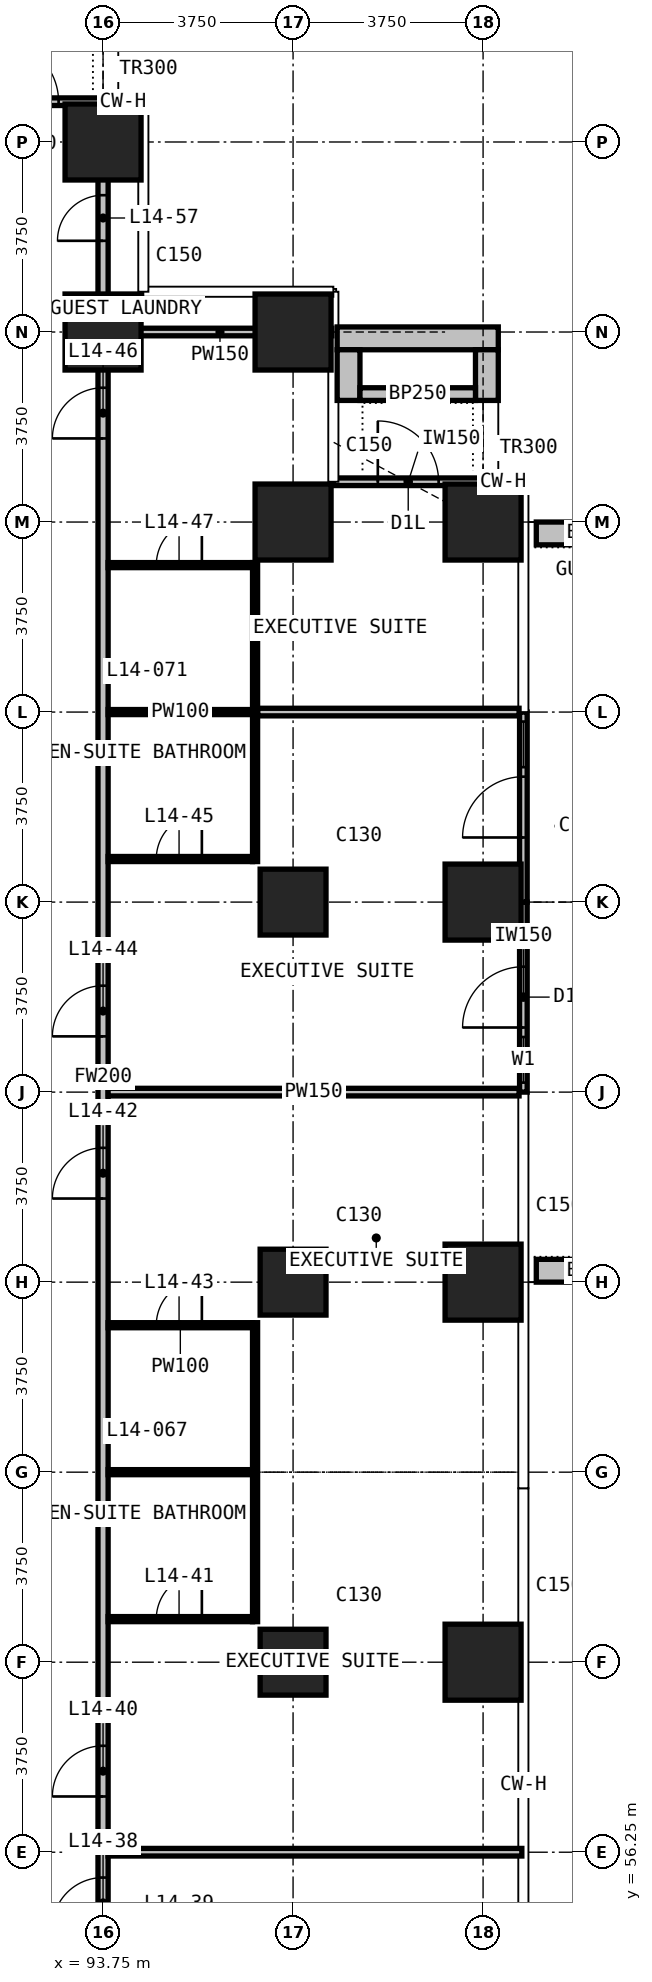
"""IFC4 building model, lengths in metres.
Left out: names, types, materials, properties, quantities, classifications, styles, units other than length and angle.
Written with IfcOpenShell. Run it as: python <this file> out.ifc"""

import sys

from ifc_helpers import new_model, si_unit, direction, frame, frame_2d, origin, origin_2d, place, context, subcontext, project, spatial, rectangle, extrude, element, fill, save


model = new_model("IFC4")
c1 = context("Model", 3, precision=1e-05, world=origin(), true_north=direction((0.0, 1.0)))
c2 = subcontext(c1, "Body", "Model", "MODEL_VIEW")
j1 = project(units=[si_unit("LENGTHUNIT", "METRE"), si_unit("PLANEANGLEUNIT", "RADIAN")], contexts=[c1])
p1 = place(None, origin())
s1 = spatial("IfcSite", under=j1, at=p1, CompositionType="ELEMENT")
p2 = place(p1, origin())
s2 = spatial("IfcBuilding", under=s1, at=p2, CompositionType="ELEMENT")
p3 = place(p2, frame((0.0, 0.0, 65.9)))
s3 = spatial("IfcBuildingStorey", under=s2, at=p3, CompositionType="ELEMENT", Elevation=65.9)
for number, where, z_axis, x_axis in (
    (1, (93.75, 86.25, 0.0), (0.0, 0.0, 1.0), (1.0, 0.0, 0.0)),
    (2, (93.75, 90.0, 0.0), (0.0, 0.0, 1.0), (1.0, 0.0, 0.0)),
):
    element("IfcColumn", number, at=place(p3, frame(where, z_axis=z_axis, x_axis=x_axis)), inside=s3, PredefinedType="COLUMN", context=c2, shape_type="SweptSolid", body=[
        extrude(rectangle(XDim=1.5, YDim=1.5, at=origin_2d()), origin(), (0.0, 0.0, 1.0), 3.3),
    ])
for number, where, z_axis, x_axis in (
    (3, (97.5, 60.0, 0.0), (0.0, 0.0, 1.0), (1.0, 0.0, 0.0)),
    (4, (97.5, 67.5, 0.0), (0.0, 0.0, 1.0), (1.0, 0.0, 0.0)),
    (5, (97.5, 75.0, 0.0), (0.0, 0.0, 1.0), (1.0, 0.0, 0.0)),
):
    element("IfcColumn", number, at=place(p3, frame(where, z_axis=z_axis, x_axis=x_axis)), inside=s3, PredefinedType="COLUMN", context=c2, shape_type="SweptSolid", body=[
        extrude(rectangle(XDim=1.3, YDim=1.3, at=origin_2d()), origin(), (0.0, 0.0, 1.0), 3.3),
    ])
for number, where, z_axis, x_axis in (
    (6, (97.5, 82.5, 0.0), (0.0, 0.0, 1.0), (1.0, 0.0, 0.0)),
    (7, (97.5, 86.25, 0.0), (0.0, 0.0, 1.0), (1.0, 0.0, 0.0)),
    (8, (101.25, 60.0, 0.0), (0.0, 0.0, 1.0), (1.0, 0.0, 0.0)),
    (9, (101.25, 67.5, 0.0), (0.0, 0.0, 1.0), (1.0, 0.0, 0.0)),
    (10, (101.25, 75.0, 0.0), (0.0, 0.0, 1.0), (1.0, 0.0, 0.0)),
    (11, (101.25, 82.5, 0.0), (0.0, 0.0, 1.0), (1.0, 0.0, 0.0)),
):
    element("IfcColumn", number, at=place(p3, frame(where, z_axis=z_axis, x_axis=x_axis)), inside=s3, PredefinedType="COLUMN", context=c2, shape_type="SweptSolid", body=[
        extrude(rectangle(XDim=1.5, YDim=1.5, at=origin_2d()), origin(), (0.0, 0.0, 1.0), 3.3),
    ])
p4 = place(p3, frame((102.045, 71.25, 0.0), z_axis=(0.0, 0.0, 1.0), x_axis=(0.0, 1.0, 0.0)))
e12 = element("IfcWall", 12, at=p4, inside=s3, PredefinedType="SOLIDWALL", context=c2, shape_type="SweptSolid", body=[
    extrude(rectangle(XDim=3.75, YDim=0.15, at=frame_2d((1.875, 0.0))), origin(), (0.0, 0.0, 1.0), 3.0),
])
p5 = place(p4, frame((0.188, 0.0, 0.1)))
e13 = element("IfcOpeningElement", 13, at=p5, cuts=e12, PredefinedType="OPENING", context=c2, shape_type="SweptSolid", body=[
    extrude(rectangle(XDim=0.9, YDim=2.4, at=frame_2d((0.45, 1.2))), frame((0.0, 0.085, 0.0), z_axis=(0.0, -1.0, 0.0), x_axis=(1.0, 0.0, 0.0)), (0.0, 0.0, 1.0), 0.17),
])
p6 = place(p4, frame((1.275, 0.0, 0.0)))
e14 = element("IfcOpeningElement", 14, at=p6, cuts=e12, PredefinedType="OPENING", context=c2, shape_type="SweptSolid", body=[
    extrude(rectangle(XDim=1.2, YDim=2.4, at=frame_2d((0.6, 1.2))), frame((0.0, 0.085, 0.0), z_axis=(0.0, -1.0, 0.0), x_axis=(1.0, 0.0, 0.0)), (0.0, 0.0, 1.0), 0.17),
])
p7 = place(p3, frame((102.045, 75.0, 0.0), z_axis=(0.0, 0.0, 1.0), x_axis=(0.0, 1.0, 0.0)))
e15 = element("IfcWall", 15, at=p7, inside=s3, PredefinedType="SOLIDWALL", context=c2, shape_type="SweptSolid", body=[
    extrude(rectangle(XDim=3.75, YDim=0.15, at=frame_2d((1.875, 0.0))), origin(), (0.0, 0.0, 1.0), 3.0),
])
p8 = place(p7, frame((1.275, 0.0, 0.0)))
e16 = element("IfcOpeningElement", 16, at=p8, cuts=e15, PredefinedType="OPENING", context=c2, shape_type="SweptSolid", body=[
    extrude(rectangle(XDim=1.2, YDim=2.4, at=frame_2d((0.6, 1.2))), frame((0.0, 0.085, 0.0), z_axis=(0.0, -1.0, 0.0), x_axis=(1.0, 0.0, 0.0)), (0.0, 0.0, 1.0), 0.17),
])
p9 = place(p7, frame((2.663, 0.0, 0.1)))
e17 = element("IfcOpeningElement", 17, at=p9, cuts=e15, PredefinedType="OPENING", context=c2, shape_type="SweptSolid", body=[
    extrude(rectangle(XDim=0.9, YDim=2.4, at=frame_2d((0.45, 1.2))), frame((0.0, 0.085, 0.0), z_axis=(0.0, -1.0, 0.0), x_axis=(1.0, 0.0, 0.0)), (0.0, 0.0, 1.0), 0.17),
])
p10 = place(p3, frame((98.295, 83.295, 0.0), z_axis=(0.0, 0.0, 1.0), x_axis=(1.0, 0.0, 0.0)))
e18 = element("IfcWall", 18, at=p10, inside=s3, PredefinedType="SOLIDWALL", context=c2, shape_type="SweptSolid", body=[
    extrude(rectangle(XDim=2.955, YDim=0.15, at=frame_2d((1.478, 0.0))), origin(), (0.0, 0.0, 1.0), 3.0),
])
p11 = place(p10, frame((0.877, 0.0, 0.0)))
e19 = element("IfcOpeningElement", 19, at=p11, cuts=e18, PredefinedType="OPENING", context=c2, shape_type="SweptSolid", body=[
    extrude(rectangle(XDim=1.2, YDim=2.0, at=frame_2d((0.6, 1.0))), frame((0.0, 0.085, 0.0), z_axis=(0.0, -1.0, 0.0), x_axis=(1.0, 0.0, 0.0)), (0.0, 0.0, 1.0), 0.17),
])
p12 = place(p3, frame((90.795, 90.795, 0.0), z_axis=(0.0, 0.0, 1.0), x_axis=(1.0, 0.0, 0.0)))
e20 = element("IfcWall", 20, at=p12, inside=s3, PredefinedType="SOLIDWALL", context=c2, shape_type="SweptSolid", body=[
    extrude(rectangle(XDim=2.955, YDim=0.15, at=frame_2d((1.478, 0.0))), origin(), (0.0, 0.0, 1.0), 3.0),
])
p13 = place(p12, frame((0.877, 0.0, 0.0)))
e21 = element("IfcOpeningElement", 21, at=p13, cuts=e20, PredefinedType="OPENING", context=c2, shape_type="SweptSolid", body=[
    extrude(rectangle(XDim=1.2, YDim=2.4, at=frame_2d((0.6, 1.2))), frame((0.0, 0.085, 0.0), z_axis=(0.0, -1.0, 0.0), x_axis=(1.0, 0.0, 0.0)), (0.0, 0.0, 1.0), 0.17),
])
for number, where, z_axis, x_axis in (
    (22, (102.3, 67.725, 0.0), (0.0, 0.0, 1.0), (1.0, 0.0, 0.0)),
    (23, (102.3, 82.275, 0.0), (0.0, 0.0, 1.0), (1.0, 0.0, 0.0)),
):
    element("IfcWall", number, at=place(p3, frame(where, z_axis=z_axis, x_axis=x_axis)), inside=s3, PredefinedType="USERDEFINED", context=c2, shape_type="SweptSolid", body=[
        extrude(rectangle(XDim=2.35, YDim=0.45, at=frame_2d((1.175, 0.0))), origin(), (0.0, 0.0, 1.0), 1.1),
    ])
p14 = place(p3, frame((98.37, 86.125, 0.0), z_axis=(0.0, 0.0, 1.0), x_axis=(1.0, 0.0, 0.0)))
e24 = element("IfcWall", 24, at=p14, inside=s3, PredefinedType="USERDEFINED", context=c2, shape_type="SweptSolid", body=[
    extrude(rectangle(XDim=3.18, YDim=0.45, at=frame_2d((1.59, 0.0))), origin(), (0.0, 0.0, 1.0), 1.1),
])
for number, where, z_axis, x_axis in (
    (25, (98.595, 84.9, 0.0), (0.0, 0.0, 1.0), (0.0, 1.0, 0.0)),
    (26, (101.325, 84.9, 0.0), (0.0, 0.0, 1.0), (0.0, 1.0, 0.0)),
):
    element("IfcWall", number, at=place(p3, frame(where, z_axis=z_axis, x_axis=x_axis)), inside=s3, PredefinedType="USERDEFINED", context=c2, shape_type="SweptSolid", body=[
        extrude(rectangle(XDim=1.0, YDim=0.45, at=frame_2d((0.5, 0.0))), origin(), (0.0, 0.0, 1.0), 1.1),
    ])
p15 = place(p3, frame((98.82, 85.025, 0.0), z_axis=(0.0, 0.0, 1.0), x_axis=(1.0, 0.0, 0.0)))
e27 = element("IfcWall", 27, at=p15, inside=s3, PredefinedType="USERDEFINED", context=c2, shape_type="SweptSolid", body=[
    extrude(rectangle(XDim=2.28, YDim=0.25, at=frame_2d((1.14, 0.0))), origin(), (0.0, 0.0, 1.0), 1.0),
])
p16 = place(p3, frame((93.75, 52.4, 0.0), z_axis=(0.0, 0.0, 1.0), x_axis=(0.0, 1.0, 0.0)))
e28 = element("IfcWall", 28, at=p16, inside=s3, PredefinedType="PARTITIONING", context=c2, shape_type="SweptSolid", body=[
    extrude(rectangle(XDim=38.31, YDim=0.2, at=frame_2d((19.155, 0.0))), origin(), (0.0, 0.0, 1.0), 3.0),
])
p17 = place(p16, frame((2.35, 0.0, 0.0)))
e29 = element("IfcOpeningElement", 29, at=p17, cuts=e28, PredefinedType="OPENING", context=c2, shape_type="SweptSolid", body=[
    extrude(rectangle(XDim=1.0, YDim=2.2, at=frame_2d((0.5, 1.1))), frame((0.0, 0.11, 0.0), z_axis=(0.0, -1.0, 0.0), x_axis=(1.0, 0.0, 0.0)), (0.0, 0.0, 1.0), 0.22),
])
p18 = place(p16, frame((4.95, 0.0, 0.0)))
e30 = element("IfcOpeningElement", 30, at=p18, cuts=e28, PredefinedType="OPENING", context=c2, shape_type="SweptSolid", body=[
    extrude(rectangle(XDim=1.0, YDim=2.2, at=frame_2d((0.5, 1.1))), frame((0.0, 0.11, 0.0), z_axis=(0.0, -1.0, 0.0), x_axis=(1.0, 0.0, 0.0)), (0.0, 0.0, 1.0), 0.22),
])
p19 = place(p16, frame((16.75, 0.0, 0.0)))
e31 = element("IfcOpeningElement", 31, at=p19, cuts=e28, PredefinedType="OPENING", context=c2, shape_type="SweptSolid", body=[
    extrude(rectangle(XDim=1.0, YDim=2.2, at=frame_2d((0.5, 1.1))), frame((0.0, 0.11, 0.0), z_axis=(0.0, -1.0, 0.0), x_axis=(1.0, 0.0, 0.0)), (0.0, 0.0, 1.0), 0.22),
])
p20 = place(p16, frame((19.95, 0.0, 0.0)))
e32 = element("IfcOpeningElement", 32, at=p20, cuts=e28, PredefinedType="OPENING", context=c2, shape_type="SweptSolid", body=[
    extrude(rectangle(XDim=1.0, YDim=2.2, at=frame_2d((0.5, 1.1))), frame((0.0, 0.11, 0.0), z_axis=(0.0, -1.0, 0.0), x_axis=(1.0, 0.0, 0.0)), (0.0, 0.0, 1.0), 0.22),
])
p21 = place(p16, frame((31.75, 0.0, 0.0)))
e33 = element("IfcOpeningElement", 33, at=p21, cuts=e28, PredefinedType="OPENING", context=c2, shape_type="SweptSolid", body=[
    extrude(rectangle(XDim=1.0, YDim=2.2, at=frame_2d((0.5, 1.1))), frame((0.0, 0.11, 0.0), z_axis=(0.0, -1.0, 0.0), x_axis=(1.0, 0.0, 0.0)), (0.0, 0.0, 1.0), 0.22),
])
p22 = place(p16, frame((35.65, 0.0, 0.0)))
e34 = element("IfcOpeningElement", 34, at=p22, cuts=e28, PredefinedType="OPENING", context=c2, shape_type="SweptSolid", body=[
    extrude(rectangle(XDim=0.9, YDim=2.2, at=frame_2d((0.45, 1.1))), frame((0.0, 0.11, 0.0), z_axis=(0.0, -1.0, 0.0), x_axis=(1.0, 0.0, 0.0)), (0.0, 0.0, 1.0), 0.22),
])
p23 = place(p3, frame((93.85, 56.25, 0.0), z_axis=(0.0, 0.0, 1.0), x_axis=(1.0, 0.0, 0.0)))
e35 = element("IfcWall", 35, at=p23, inside=s3, PredefinedType="PARTITIONING", context=c2, shape_type="SweptSolid", body=[
    extrude(rectangle(XDim=8.165, YDim=0.15, at=frame_2d((4.083, 0.0))), origin(), (0.0, 0.0, 1.0), 3.0),
])
p24 = place(p3, frame((93.85, 71.25, 0.0), z_axis=(0.0, 0.0, 1.0), x_axis=(1.0, 0.0, 0.0)))
e36 = element("IfcWall", 36, at=p24, inside=s3, PredefinedType="PARTITIONING", context=c2, shape_type="SweptSolid", body=[
    extrude(rectangle(XDim=8.11, YDim=0.15, at=frame_2d((4.055, 0.0))), origin(), (0.0, 0.0, 1.0), 3.0),
])
p25 = place(p3, frame((96.8, 78.75, 0.0), z_axis=(0.0, 0.0, 1.0), x_axis=(1.0, 0.0, 0.0)))
e37 = element("IfcWall", 37, at=p25, inside=s3, PredefinedType="PARTITIONING", context=c2, shape_type="SweptSolid", body=[
    extrude(rectangle(XDim=5.16, YDim=0.15, at=frame_2d((2.58, 0.0))), origin(), (0.0, 0.0, 1.0), 3.0),
])
p26 = place(p3, frame((93.85, 86.25, 0.0), z_axis=(0.0, 0.0, 1.0), x_axis=(1.0, 0.0, 0.0)))
e38 = element("IfcWall", 38, at=p26, inside=s3, PredefinedType="PARTITIONING", context=c2, shape_type="SweptSolid", body=[
    extrude(rectangle(XDim=4.415, YDim=0.15, at=frame_2d((2.208, 0.0))), origin(), (0.0, 0.0, 1.0), 3.0),
])
p27 = place(p3, frame((93.85, 60.85, 0.0), z_axis=(0.0, 0.0, 1.0), x_axis=(1.0, 0.0, 0.0)))
e39 = element("IfcWall", 39, at=p27, inside=s3, PredefinedType="PARTITIONING", context=c2, shape_type="SweptSolid", body=[
    extrude(rectangle(XDim=2.85, YDim=0.1, at=frame_2d((1.425, 0.0))), origin(), (0.0, 0.0, 1.0), 3.0),
])
p28 = place(p27, frame((0.95, 0.0, 0.0)))
e40 = element("IfcOpeningElement", 40, at=p28, cuts=e39, PredefinedType="OPENING", context=c2, shape_type="SweptSolid", body=[
    extrude(rectangle(XDim=0.9, YDim=2.2, at=frame_2d((0.45, 1.1))), frame((0.0, 0.06, 0.0), z_axis=(0.0, -1.0, 0.0), x_axis=(1.0, 0.0, 0.0)), (0.0, 0.0, 1.0), 0.12),
])
p29 = place(p3, frame((93.85, 63.75, 0.0), z_axis=(0.0, 0.0, 1.0), x_axis=(1.0, 0.0, 0.0)))
e41 = element("IfcWall", 41, at=p29, inside=s3, PredefinedType="PARTITIONING", context=c2, shape_type="SweptSolid", body=[
    extrude(rectangle(XDim=2.85, YDim=0.1, at=frame_2d((1.425, 0.0))), origin(), (0.0, 0.0, 1.0), 3.0),
])
p30 = place(p3, frame((93.85, 66.65, 0.0), z_axis=(0.0, 0.0, 1.0), x_axis=(1.0, 0.0, 0.0)))
e42 = element("IfcWall", 42, at=p30, inside=s3, PredefinedType="PARTITIONING", context=c2, shape_type="SweptSolid", body=[
    extrude(rectangle(XDim=2.85, YDim=0.1, at=frame_2d((1.425, 0.0))), origin(), (0.0, 0.0, 1.0), 3.0),
])
p31 = place(p30, frame((0.95, 0.0, 0.0)))
e43 = element("IfcOpeningElement", 43, at=p31, cuts=e42, PredefinedType="OPENING", context=c2, shape_type="SweptSolid", body=[
    extrude(rectangle(XDim=0.9, YDim=2.2, at=frame_2d((0.45, 1.1))), frame((0.0, 0.06, 0.0), z_axis=(0.0, -1.0, 0.0), x_axis=(1.0, 0.0, 0.0)), (0.0, 0.0, 1.0), 0.12),
])
p32 = place(p3, frame((93.85, 75.85, 0.0), z_axis=(0.0, 0.0, 1.0), x_axis=(1.0, 0.0, 0.0)))
e44 = element("IfcWall", 44, at=p32, inside=s3, PredefinedType="PARTITIONING", context=c2, shape_type="SweptSolid", body=[
    extrude(rectangle(XDim=2.85, YDim=0.1, at=frame_2d((1.425, 0.0))), origin(), (0.0, 0.0, 1.0), 3.0),
])
p33 = place(p32, frame((0.95, 0.0, 0.0)))
e45 = element("IfcOpeningElement", 45, at=p33, cuts=e44, PredefinedType="OPENING", context=c2, shape_type="SweptSolid", body=[
    extrude(rectangle(XDim=0.9, YDim=2.2, at=frame_2d((0.45, 1.1))), frame((0.0, 0.06, 0.0), z_axis=(0.0, -1.0, 0.0), x_axis=(1.0, 0.0, 0.0)), (0.0, 0.0, 1.0), 0.12),
])
p34 = place(p3, frame((93.85, 78.75, 0.0), z_axis=(0.0, 0.0, 1.0), x_axis=(1.0, 0.0, 0.0)))
e46 = element("IfcWall", 46, at=p34, inside=s3, PredefinedType="PARTITIONING", context=c2, shape_type="SweptSolid", body=[
    extrude(rectangle(XDim=2.85, YDim=0.1, at=frame_2d((1.425, 0.0))), origin(), (0.0, 0.0, 1.0), 3.0),
])
p35 = place(p3, frame((93.85, 81.65, 0.0), z_axis=(0.0, 0.0, 1.0), x_axis=(1.0, 0.0, 0.0)))
e47 = element("IfcWall", 47, at=p35, inside=s3, PredefinedType="PARTITIONING", context=c2, shape_type="SweptSolid", body=[
    extrude(rectangle(XDim=2.85, YDim=0.1, at=frame_2d((1.425, 0.0))), origin(), (0.0, 0.0, 1.0), 3.0),
])
p36 = place(p35, frame((0.95, 0.0, 0.0)))
e48 = element("IfcOpeningElement", 48, at=p36, cuts=e47, PredefinedType="OPENING", context=c2, shape_type="SweptSolid", body=[
    extrude(rectangle(XDim=0.9, YDim=2.2, at=frame_2d((0.45, 1.1))), frame((0.0, 0.06, 0.0), z_axis=(0.0, -1.0, 0.0), x_axis=(1.0, 0.0, 0.0)), (0.0, 0.0, 1.0), 0.12),
])
for number, where, z_axis, x_axis in (
    (49, (96.75, 60.8, 0.0), (0.0, 0.0, 1.0), (0.0, 1.0, 0.0)),
    (50, (96.75, 75.8, 0.0), (0.0, 0.0, 1.0), (0.0, 1.0, 0.0)),
):
    element("IfcWall", number, at=place(p3, frame(where, z_axis=z_axis, x_axis=x_axis)), inside=s3, PredefinedType="PARTITIONING", context=c2, shape_type="SweptSolid", body=[
        extrude(rectangle(XDim=5.9, YDim=0.1, at=frame_2d((2.95, 0.0))), origin(), (0.0, 0.0, 1.0), 3.0),
    ])
p37 = place(p5, origin())
e51 = element("IfcWindow", 51, at=p37, inside=s3, PartitioningType="SINGLE_PANEL", PredefinedType="WINDOW", context=c2, shape_type="SweptSolid", body=[
    extrude(rectangle(XDim=0.9, YDim=2.4, at=frame_2d((0.45, 1.2))), frame((0.0, 0.03, 0.0), z_axis=(0.0, -1.0, 0.0), x_axis=(1.0, 0.0, 0.0)), (0.0, 0.0, 1.0), 0.06),
])
fill(e13, e51)
p38 = place(p6, origin())
e52 = element("IfcDoor", 52, at=p38, inside=s3, OperationType="SINGLE_SWING_LEFT", PredefinedType="DOOR", context=c2, shape_type="SweptSolid", body=[
    extrude(rectangle(XDim=1.2, YDim=2.4, at=frame_2d((0.6, 1.2))), frame((0.0, 0.025, 0.0), z_axis=(0.0, -1.0, 0.0), x_axis=(1.0, 0.0, 0.0)), (0.0, 0.0, 1.0), 0.05),
])
fill(e14, e52)
p39 = place(p8, origin())
e53 = element("IfcDoor", 53, at=p39, inside=s3, OperationType="SINGLE_SWING_LEFT", PredefinedType="DOOR", context=c2, shape_type="SweptSolid", body=[
    extrude(rectangle(XDim=1.2, YDim=2.4, at=frame_2d((0.6, 1.2))), frame((0.0, 0.025, 0.0), z_axis=(0.0, -1.0, 0.0), x_axis=(1.0, 0.0, 0.0)), (0.0, 0.0, 1.0), 0.05),
])
fill(e16, e53)
p40 = place(p9, origin())
e54 = element("IfcWindow", 54, at=p40, inside=s3, PartitioningType="SINGLE_PANEL", PredefinedType="WINDOW", context=c2, shape_type="SweptSolid", body=[
    extrude(rectangle(XDim=0.9, YDim=2.4, at=frame_2d((0.45, 1.2))), frame((0.0, 0.03, 0.0), z_axis=(0.0, -1.0, 0.0), x_axis=(1.0, 0.0, 0.0)), (0.0, 0.0, 1.0), 0.06),
])
fill(e17, e54)
p41 = place(p11, origin())
e55 = element("IfcDoor", 55, at=p41, inside=s3, OperationType="SINGLE_SWING_LEFT", PredefinedType="DOOR", context=c2, shape_type="SweptSolid", body=[
    extrude(rectangle(XDim=1.2, YDim=2.0, at=frame_2d((0.6, 1.0))), frame((0.0, 0.025, 0.0), z_axis=(0.0, -1.0, 0.0), x_axis=(1.0, 0.0, 0.0)), (0.0, 0.0, 1.0), 0.05),
])
fill(e19, e55)
p42 = place(p13, origin())
e56 = element("IfcDoor", 56, at=p42, inside=s3, OperationType="SINGLE_SWING_LEFT", PredefinedType="DOOR", context=c2, shape_type="SweptSolid", body=[
    extrude(rectangle(XDim=1.2, YDim=2.4, at=frame_2d((0.6, 1.2))), frame((0.0, 0.025, 0.0), z_axis=(0.0, -1.0, 0.0), x_axis=(1.0, 0.0, 0.0)), (0.0, 0.0, 1.0), 0.05),
])
fill(e21, e56)
p43 = place(p17, origin())
e57 = element("IfcDoor", 57, at=p43, inside=s3, OperationType="SINGLE_SWING_RIGHT", PredefinedType="DOOR", context=c2, shape_type="SweptSolid", body=[
    extrude(rectangle(XDim=1.0, YDim=2.2, at=frame_2d((0.5, 1.1))), frame((0.0, 0.025, 0.0), z_axis=(0.0, -1.0, 0.0), x_axis=(1.0, 0.0, 0.0)), (0.0, 0.0, 1.0), 0.05),
])
fill(e29, e57)
p44 = place(p18, origin())
e58 = element("IfcDoor", 58, at=p44, inside=s3, OperationType="SINGLE_SWING_LEFT", PredefinedType="DOOR", context=c2, shape_type="SweptSolid", body=[
    extrude(rectangle(XDim=1.0, YDim=2.2, at=frame_2d((0.5, 1.1))), frame((0.0, 0.025, 0.0), z_axis=(0.0, -1.0, 0.0), x_axis=(1.0, 0.0, 0.0)), (0.0, 0.0, 1.0), 0.05),
])
fill(e30, e58)
p45 = place(p28, origin())
e59 = element("IfcDoor", 59, at=p45, inside=s3, OperationType="SINGLE_SWING_RIGHT", PredefinedType="DOOR", context=c2, shape_type="SweptSolid", body=[
    extrude(rectangle(XDim=0.9, YDim=2.2, at=frame_2d((0.45, 1.1))), frame((0.0, 0.025, 0.0), z_axis=(0.0, -1.0, 0.0), x_axis=(1.0, 0.0, 0.0)), (0.0, 0.0, 1.0), 0.05),
])
fill(e40, e59)
p46 = place(p19, origin())
e60 = element("IfcDoor", 60, at=p46, inside=s3, OperationType="SINGLE_SWING_RIGHT", PredefinedType="DOOR", context=c2, shape_type="SweptSolid", body=[
    extrude(rectangle(XDim=1.0, YDim=2.2, at=frame_2d((0.5, 1.1))), frame((0.0, 0.025, 0.0), z_axis=(0.0, -1.0, 0.0), x_axis=(1.0, 0.0, 0.0)), (0.0, 0.0, 1.0), 0.05),
])
fill(e31, e60)
p47 = place(p31, origin())
e61 = element("IfcDoor", 61, at=p47, inside=s3, OperationType="SINGLE_SWING_RIGHT", PredefinedType="DOOR", context=c2, shape_type="SweptSolid", body=[
    extrude(rectangle(XDim=0.9, YDim=2.2, at=frame_2d((0.45, 1.1))), frame((0.0, 0.025, 0.0), z_axis=(0.0, -1.0, 0.0), x_axis=(1.0, 0.0, 0.0)), (0.0, 0.0, 1.0), 0.05),
])
fill(e43, e61)
p48 = place(p20, origin())
e62 = element("IfcDoor", 62, at=p48, inside=s3, OperationType="SINGLE_SWING_LEFT", PredefinedType="DOOR", context=c2, shape_type="SweptSolid", body=[
    extrude(rectangle(XDim=1.0, YDim=2.2, at=frame_2d((0.5, 1.1))), frame((0.0, 0.025, 0.0), z_axis=(0.0, -1.0, 0.0), x_axis=(1.0, 0.0, 0.0)), (0.0, 0.0, 1.0), 0.05),
])
fill(e32, e62)
p49 = place(p33, origin())
e63 = element("IfcDoor", 63, at=p49, inside=s3, OperationType="SINGLE_SWING_RIGHT", PredefinedType="DOOR", context=c2, shape_type="SweptSolid", body=[
    extrude(rectangle(XDim=0.9, YDim=2.2, at=frame_2d((0.45, 1.1))), frame((0.0, 0.025, 0.0), z_axis=(0.0, -1.0, 0.0), x_axis=(1.0, 0.0, 0.0)), (0.0, 0.0, 1.0), 0.05),
])
fill(e45, e63)
p50 = place(p21, origin())
e64 = element("IfcDoor", 64, at=p50, inside=s3, OperationType="SINGLE_SWING_LEFT", PredefinedType="DOOR", context=c2, shape_type="SweptSolid", body=[
    extrude(rectangle(XDim=1.0, YDim=2.2, at=frame_2d((0.5, 1.1))), frame((0.0, 0.025, 0.0), z_axis=(0.0, -1.0, 0.0), x_axis=(1.0, 0.0, 0.0)), (0.0, 0.0, 1.0), 0.05),
])
fill(e33, e64)
p51 = place(p36, origin())
e65 = element("IfcDoor", 65, at=p51, inside=s3, OperationType="SINGLE_SWING_RIGHT", PredefinedType="DOOR", context=c2, shape_type="SweptSolid", body=[
    extrude(rectangle(XDim=0.9, YDim=2.2, at=frame_2d((0.45, 1.1))), frame((0.0, 0.025, 0.0), z_axis=(0.0, -1.0, 0.0), x_axis=(1.0, 0.0, 0.0)), (0.0, 0.0, 1.0), 0.05),
])
fill(e48, e65)
p52 = place(p22, origin())
e66 = element("IfcDoor", 66, at=p52, inside=s3, OperationType="SINGLE_SWING_RIGHT", PredefinedType="DOOR", context=c2, shape_type="SweptSolid", body=[
    extrude(rectangle(XDim=0.9, YDim=2.2, at=frame_2d((0.45, 1.1))), frame((0.0, 0.025, 0.0), z_axis=(0.0, -1.0, 0.0), x_axis=(1.0, 0.0, 0.0)), (0.0, 0.0, 1.0), 0.05),
])
fill(e34, e66)
save(model, sys.argv[1])
